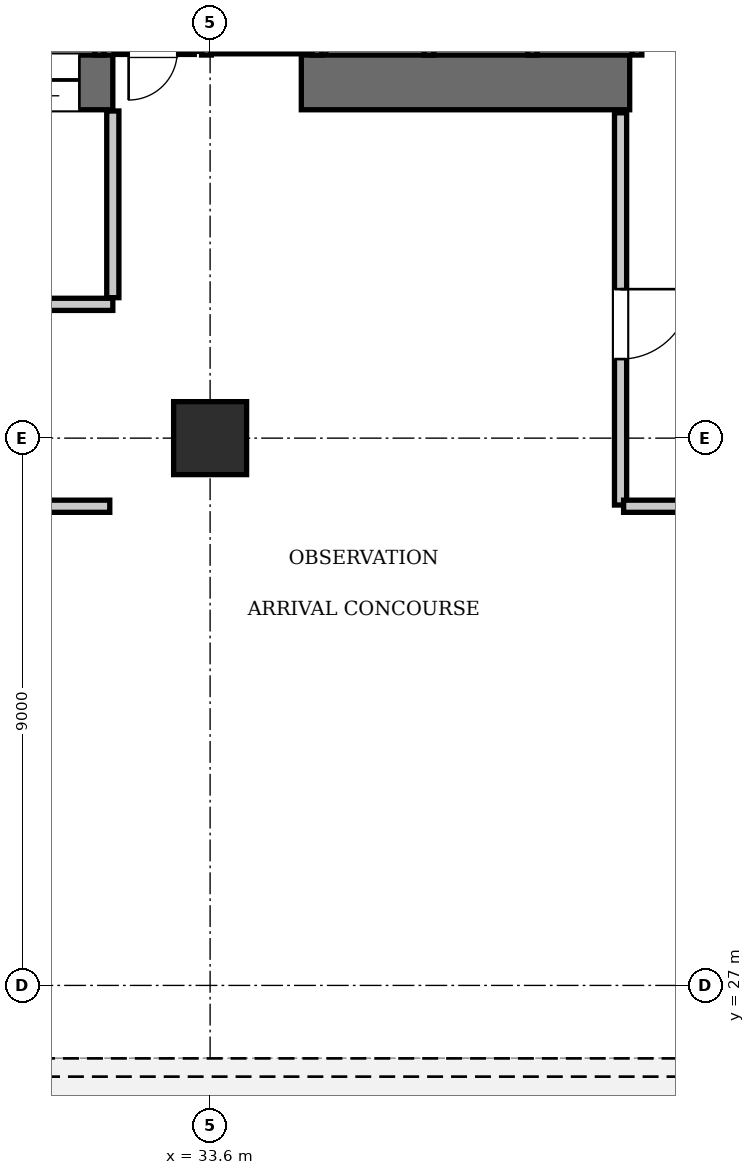
"""IFC4 building model, lengths in metres.
Left out: names, types, materials, properties, quantities, classifications, styles, units other than length and angle.
Written with IfcOpenShell. Run it as: python <this file> out.ifc"""

import sys

from ifc_helpers import new_model, si_unit, direction, frame, frame_2d, origin, origin_2d, place, context, subcontext, project, spatial, rectangle, extrude, element, fill, save


model = new_model("IFC4")
c1 = context("Model", 3, precision=1e-05, world=origin(), true_north=direction((0.0, 1.0)))
c2 = subcontext(c1, "Body", "Model", "MODEL_VIEW")
j1 = project(units=[si_unit("LENGTHUNIT", "METRE"), si_unit("PLANEANGLEUNIT", "RADIAN")], contexts=[c1])
p1 = place(None, origin())
s1 = spatial("IfcSite", under=j1, at=p1, CompositionType="ELEMENT")
p2 = place(p1, origin())
s2 = spatial("IfcBuilding", under=s1, at=p2, CompositionType="ELEMENT")
p3 = place(p2, origin())
s3 = spatial("IfcBuildingStorey", under=s2, at=p3, CompositionType="ELEMENT", Elevation=0.0)
p4 = place(p3, frame((25.2, 41.85, 0.0), z_axis=(0.0, 0.0, 1.0), x_axis=(1.0, 0.0, 0.0)))
e1 = element("IfcWall", 1, at=p4, inside=s3, PredefinedType="SHEAR", context=c2, shape_type="SweptSolid", body=[
    extrude(rectangle(XDim=6.8, YDim=0.9, at=frame_2d((3.4, 0.0))), origin(), (0.0, 0.0, 1.0), 5.6),
])
p5 = place(p4, frame((1.65, 0.0, 0.0)))
e2 = element("IfcOpeningElement", 2, at=p5, cuts=e1, PredefinedType="OPENING", context=c2, shape_type="SweptSolid", body=[
    extrude(rectangle(XDim=1.15, YDim=2.15, at=frame_2d((0.575, 1.075))), frame((0.0, 0.46, 0.0), z_axis=(0.0, -1.0, 0.0), x_axis=(1.0, 0.0, 0.0)), (0.0, 0.0, 1.0), 0.92),
])
p6 = place(p4, frame((5.15, 0.0, 0.0)))
e3 = element("IfcOpeningElement", 3, at=p6, cuts=e1, PredefinedType="OPENING", context=c2, shape_type="SweptSolid", body=[
    extrude(rectangle(XDim=1.1, YDim=2.2, at=frame_2d((0.55, 1.1))), frame((0.0, 0.46, 0.0), z_axis=(0.0, -1.0, 0.0), x_axis=(1.0, 0.0, 0.0)), (0.0, 0.0, 1.0), 0.92),
])
p7 = place(p3, frame((35.1, 41.85, 0.0), z_axis=(0.0, 0.0, 1.0), x_axis=(1.0, 0.0, 0.0)))
e4 = element("IfcWall", 4, at=p7, inside=s3, PredefinedType="SHEAR", context=c2, shape_type="SweptSolid", body=[
    extrude(rectangle(XDim=5.4, YDim=0.9, at=frame_2d((2.7, 0.0))), origin(), (0.0, 0.0, 1.0), 5.6),
])
p8 = place(p3, frame((33.6, 36.0, 0.0), z_axis=(0.0, 0.0, 1.0), x_axis=(1.0, 0.0, 0.0)))
e5 = element("IfcColumn", 5, at=p8, inside=s3, PredefinedType="COLUMN", context=c2, shape_type="SweptSolid", body=[
    extrude(rectangle(XDim=1.2, YDim=1.2, at=origin_2d()), origin(), (0.0, 0.0, 1.0), 5.6),
])
p9 = place(p3, frame((31.78, 42.3, 0.0), z_axis=(0.0, 0.0, 1.0), x_axis=(0.0, 1.0, 0.0)))
e6 = element("IfcWall", 6, at=p9, inside=s3, PredefinedType="SOLIDWALL", context=c2, shape_type="SweptSolid", body=[
    extrude(rectangle(XDim=2.44, YDim=0.16, at=frame_2d((1.22, 0.0))), origin(), (0.0, 0.0, 1.0), 5.32),
])
for number, where, z_axis, x_axis in (
    (7, (37.2, 42.3, 0.0), (0.0, 0.0, 1.0), (0.0, 1.0, 0.0)),
    (8, (38.9, 42.3, 0.0), (0.0, 0.0, 1.0), (0.0, 1.0, 0.0)),
    (9, (40.62, 42.3, 0.0), (0.0, 0.0, 1.0), (0.0, 1.0, 0.0)),
):
    element("IfcWall", number, at=place(p3, frame(where, z_axis=z_axis, x_axis=x_axis)), inside=s3, PredefinedType="SOLIDWALL", context=c2, shape_type="SweptSolid", body=[
        extrude(rectangle(XDim=2.05, YDim=0.16, at=frame_2d((1.025, 0.0))), origin(), (0.0, 0.0, 1.0), 5.32),
    ])
for number, where, z_axis, x_axis in (
    (10, (33.54, 42.3, 0.0), (0.0, 0.0, 1.0), (0.0, 1.0, 0.0)),
    (11, (35.36, 42.3, 0.0), (0.0, 0.0, 1.0), (0.0, 1.0, 0.0)),
):
    element("IfcWall", number, at=place(p3, frame(where, z_axis=z_axis, x_axis=x_axis)), inside=s3, PredefinedType="SOLIDWALL", context=c2, shape_type="SweptSolid", body=[
        extrude(rectangle(XDim=2.1, YDim=0.16, at=frame_2d((1.05, 0.0))), origin(), (0.0, 0.0, 1.0), 5.32),
    ])
p10 = place(p3, frame((33.62, 42.4, 0.0), z_axis=(0.0, 0.0, 1.0), x_axis=(1.0, 0.0, 0.0)))
e12 = element("IfcWall", 12, at=p10, inside=s3, PredefinedType="SOLIDWALL", context=c2, shape_type="SweptSolid", body=[
    extrude(rectangle(XDim=1.66, YDim=0.16, at=frame_2d((0.83, 0.0))), origin(), (0.0, 0.0, 1.0), 5.32),
])
p11 = place(p3, frame((26.2, 38.2, 0.0), z_axis=(0.0, 0.0, 1.0), x_axis=(1.0, 0.0, 0.0)))
e13 = element("IfcWall", 13, at=p11, inside=s3, PredefinedType="PARTITIONING", context=c2, shape_type="SweptSolid", body=[
    extrude(rectangle(XDim=5.8, YDim=0.2, at=frame_2d((2.9, 0.0))), origin(), (0.0, 0.0, 1.0), 5.32),
])
p12 = place(p11, frame((2.3, 0.0, 0.0)))
e14 = element("IfcOpeningElement", 14, at=p12, cuts=e13, PredefinedType="OPENING", context=c2, shape_type="SweptSolid", body=[
    extrude(rectangle(XDim=1.15, YDim=2.15, at=frame_2d((0.575, 1.075))), frame((0.0, 0.11, 0.0), z_axis=(0.0, -1.0, 0.0), x_axis=(1.0, 0.0, 0.0)), (0.0, 0.0, 1.0), 0.22),
])
p13 = place(p3, frame((32.0, 38.31, 0.0), z_axis=(0.0, 0.0, 1.0), x_axis=(0.0, 1.0, 0.0)))
e15 = element("IfcWall", 15, at=p13, inside=s3, PredefinedType="PARTITIONING", context=c2, shape_type="SweptSolid", body=[
    extrude(rectangle(XDim=3.07, YDim=0.2, at=frame_2d((1.535, 0.0))), origin(), (0.0, 0.0, 1.0), 5.32),
])
p14 = place(p3, frame((32.02, 42.36, 0.0), z_axis=(0.0, 0.0, 1.0), x_axis=(1.0, 0.0, 0.0)))
e16 = element("IfcWall", 16, at=p14, inside=s3, PredefinedType="PARTITIONING", context=c2, shape_type="SweptSolid", body=[
    extrude(rectangle(XDim=1.32, YDim=0.1, at=frame_2d((0.66, 0.0))), origin(), (0.0, 0.0, 1.0), 5.32),
])
p15 = place(p14, frame((0.24, 0.0, 0.0)))
e17 = element("IfcOpeningElement", 17, at=p15, cuts=e16, PredefinedType="OPENING", context=c2, shape_type="SweptSolid", body=[
    extrude(rectangle(XDim=0.8, YDim=2.05, at=frame_2d((0.4, 1.025))), frame((0.0, 0.06, 0.0), z_axis=(0.0, -1.0, 0.0), x_axis=(1.0, 0.0, 0.0)), (0.0, 0.0, 1.0), 0.12),
])
p16 = place(p3, frame((21.75, 34.88, 0.0), z_axis=(0.0, 0.0, 1.0), x_axis=(1.0, 0.0, 0.0)))
e18 = element("IfcWall", 18, at=p16, inside=s3, PredefinedType="PARTITIONING", context=c2, shape_type="SweptSolid", body=[
    extrude(rectangle(XDim=10.2, YDim=0.2, at=frame_2d((5.1, 0.0))), origin(), (0.0, 0.0, 1.0), 5.32),
])
p17 = place(p16, frame((1.2, 0.0, 0.0)))
e19 = element("IfcOpeningElement", 19, at=p17, cuts=e18, PredefinedType="OPENING", context=c2, shape_type="SweptSolid", body=[
    extrude(rectangle(XDim=1.15, YDim=2.15, at=frame_2d((0.575, 1.075))), frame((0.0, 0.11, 0.0), z_axis=(0.0, -1.0, 0.0), x_axis=(1.0, 0.0, 0.0)), (0.0, 0.0, 1.0), 0.22),
])
p18 = place(p3, frame((40.35, 34.9, 0.0), z_axis=(0.0, 0.0, 1.0), x_axis=(0.0, 1.0, 0.0)))
e20 = element("IfcWall", 20, at=p18, inside=s3, PredefinedType="PARTITIONING", context=c2, shape_type="SweptSolid", body=[
    extrude(rectangle(XDim=6.45, YDim=0.2, at=frame_2d((3.225, 0.0))), origin(), (0.0, 0.0, 1.0), 5.32),
])
p19 = place(p18, frame((2.4, 0.0, 0.0)))
e21 = element("IfcOpeningElement", 21, at=p19, cuts=e20, PredefinedType="OPENING", context=c2, shape_type="SweptSolid", body=[
    extrude(rectangle(XDim=1.15, YDim=2.15, at=frame_2d((0.575, 1.075))), frame((0.0, 0.11, 0.0), z_axis=(0.0, -1.0, 0.0), x_axis=(1.0, 0.0, 0.0)), (0.0, 0.0, 1.0), 0.22),
])
p20 = place(p3, frame((40.4, 34.88, 0.0), z_axis=(0.0, 0.0, 1.0), x_axis=(1.0, 0.0, 0.0)))
e22 = element("IfcWall", 22, at=p20, inside=s3, PredefinedType="PARTITIONING", context=c2, shape_type="SweptSolid", body=[
    extrude(rectangle(XDim=3.15, YDim=0.2, at=frame_2d((1.575, 0.0))), origin(), (0.0, 0.0, 1.0), 5.32),
])
p21 = place(p6, frame((1.1, 0.0, 0.0), z_axis=(0.0, 0.0, 1.0), x_axis=(-1.0, 0.0, 0.0)))
e23 = element("IfcDoor", 23, at=p21, inside=s3, OperationType="SLIDING_TO_LEFT", PredefinedType="DOOR", context=c2, shape_type="SweptSolid", body=[
    extrude(rectangle(XDim=1.1, YDim=2.2, at=frame_2d((0.55, 1.1))), frame((0.0, 0.025, 0.0), z_axis=(0.0, -1.0, 0.0), x_axis=(1.0, 0.0, 0.0)), (0.0, 0.0, 1.0), 0.05),
])
fill(e3, e23)
p22 = place(p15, frame((0.8, 0.0, 0.0), z_axis=(0.0, 0.0, 1.0), x_axis=(-1.0, 0.0, 0.0)))
e24 = element("IfcDoor", 24, at=p22, inside=s3, OperationType="SINGLE_SWING_RIGHT", PredefinedType="DOOR", context=c2, shape_type="SweptSolid", body=[
    extrude(rectangle(XDim=0.8, YDim=2.05, at=frame_2d((0.4, 1.025))), frame((0.0, 0.025, 0.0), z_axis=(0.0, -1.0, 0.0), x_axis=(1.0, 0.0, 0.0)), (0.0, 0.0, 1.0), 0.05),
])
fill(e17, e24)
p23 = place(p19, frame((1.15, 0.0, 0.0), z_axis=(0.0, 0.0, 1.0), x_axis=(-1.0, 0.0, 0.0)))
e25 = element("IfcDoor", 25, at=p23, inside=s3, OperationType="SINGLE_SWING_LEFT", PredefinedType="DOOR", context=c2, shape_type="SweptSolid", body=[
    extrude(rectangle(XDim=1.15, YDim=2.15, at=frame_2d((0.575, 1.075))), frame((0.0, 0.025, 0.0), z_axis=(0.0, -1.0, 0.0), x_axis=(1.0, 0.0, 0.0)), (0.0, 0.0, 1.0), 0.05),
])
fill(e21, e25)
save(model, sys.argv[1])
